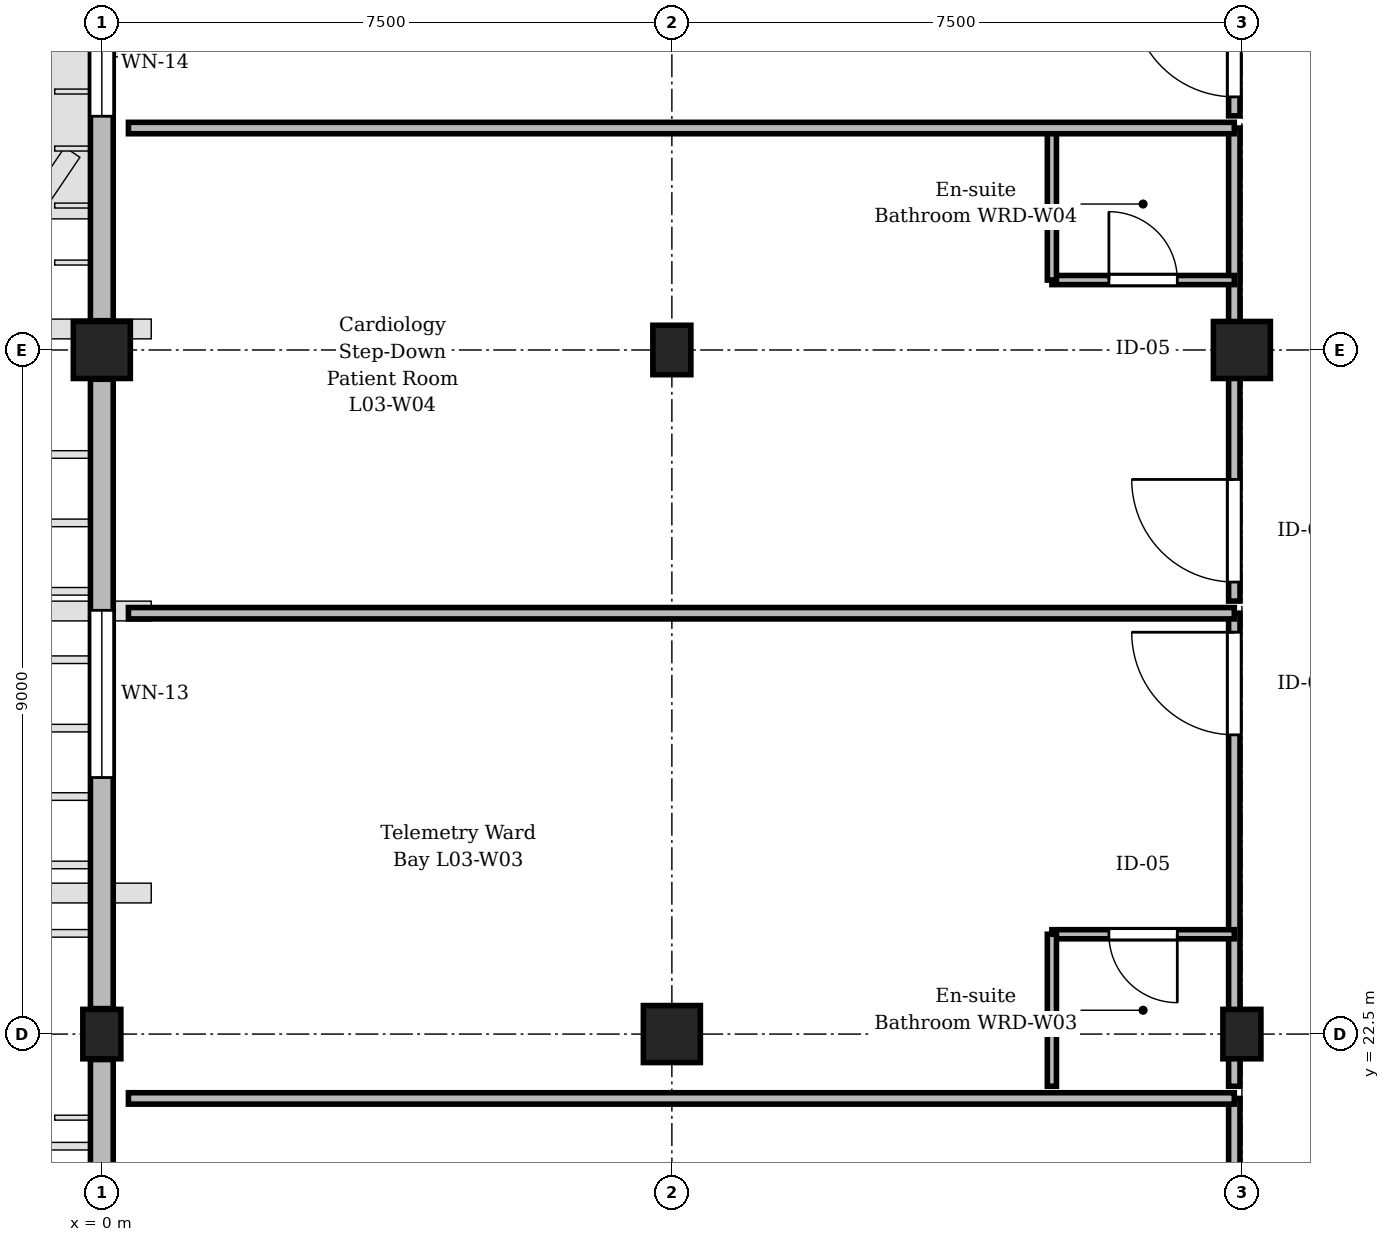
"""IFC4 building model, lengths in metres.
Left out: names, types, materials, properties, quantities, classifications, styles, units other than length and angle.
Written with IfcOpenShell. Run it as: python <this file> out.ifc"""

import sys

from ifc_helpers import new_model, si_unit, direction, frame, frame_2d, origin, origin_2d, place, context, subcontext, project, spatial, rectangle, extrude, element, fill, save


model = new_model("IFC4")
c1 = context("Model", 3, precision=1e-05, world=origin(), true_north=direction((0.0, 1.0)))
c2 = subcontext(c1, "Body", "Model", "MODEL_VIEW")
j1 = project(units=[si_unit("LENGTHUNIT", "METRE"), si_unit("PLANEANGLEUNIT", "RADIAN")], contexts=[c1])
p1 = place(None, origin())
s1 = spatial("IfcSite", under=j1, at=p1, CompositionType="ELEMENT")
p2 = place(p1, origin())
s2 = spatial("IfcBuilding", under=s1, at=p2, CompositionType="ELEMENT")
p3 = place(p2, frame((0.0, 0.0, 14.1)))
s3 = spatial("IfcBuildingStorey", under=s2, at=p3, CompositionType="ELEMENT", Elevation=14.1)
p4 = place(p3, frame((0.0, 22.5, 0.0), z_axis=(0.0, 0.0, 1.0), x_axis=(1.0, 0.0, 0.0)))
e1 = element("IfcColumn", 1, at=p4, inside=s3, PredefinedType="COLUMN", context=c2, shape_type="SweptSolid", body=[
    extrude(rectangle(XDim=0.5, YDim=0.65, at=origin_2d()), origin(), (0.0, 0.0, 1.0), 3.75),
])
for number, where, z_axis, x_axis in (
    (2, (0.0, 31.5, 0.0), (0.0, 0.0, 1.0), (1.0, 0.0, 0.0)),
    (3, (7.5, 22.5, 0.0), (0.0, 0.0, 1.0), (1.0, 0.0, 0.0)),
):
    element("IfcColumn", number, at=place(p3, frame(where, z_axis=z_axis, x_axis=x_axis)), inside=s3, PredefinedType="COLUMN", context=c2, shape_type="SweptSolid", body=[
        extrude(rectangle(XDim=0.75, YDim=0.75, at=origin_2d()), origin(), (0.0, 0.0, 1.0), 3.75),
    ])
for number, where, z_axis, x_axis in (
    (4, (7.5, 31.5, 0.0), (0.0, 0.0, 1.0), (1.0, 0.0, 0.0)),
    (5, (15.0, 22.5, 0.0), (0.0, 0.0, 1.0), (1.0, 0.0, 0.0)),
):
    element("IfcColumn", number, at=place(p3, frame(where, z_axis=z_axis, x_axis=x_axis)), inside=s3, PredefinedType="COLUMN", context=c2, shape_type="SweptSolid", body=[
        extrude(rectangle(XDim=0.5, YDim=0.65, at=origin_2d()), origin(), (0.0, 0.0, 1.0), 3.75),
    ])
p5 = place(p3, frame((15.0, 31.5, 0.0), z_axis=(0.0, 0.0, 1.0), x_axis=(1.0, 0.0, 0.0)))
e6 = element("IfcColumn", 6, at=p5, inside=s3, PredefinedType="COLUMN", context=c2, shape_type="SweptSolid", body=[
    extrude(rectangle(XDim=0.75, YDim=0.75, at=origin_2d()), origin(), (0.0, 0.0, 1.0), 3.75),
])
p6 = place(p3, frame((0.0, 15.385, 0.0), z_axis=(0.0, 0.0, 1.0), x_axis=(0.0, 1.0, 0.0)))
e7 = element("IfcWall", 7, at=p6, inside=s3, PredefinedType="STANDARD", context=c2, shape_type="SweptSolid", body=[
    extrude(rectangle(XDim=6.78, YDim=0.3, at=frame_2d((3.39, 0.0))), origin(), (0.0, 0.0, 1.0), 2.87),
])
p7 = place(p6, frame((2.39, 0.0, 0.9)))
e8 = element("IfcOpeningElement", 8, at=p7, cuts=e7, PredefinedType="OPENING", context=c2, shape_type="SweptSolid", body=[
    extrude(rectangle(XDim=2.0, YDim=1.69, at=frame_2d((1.0, 0.845))), frame((0.0, 0.16, 0.0), z_axis=(0.0, -1.0, 0.0), x_axis=(1.0, 0.0, 0.0)), (0.0, 0.0, 1.0), 0.32),
])
p8 = place(p3, frame((0.0, 22.835, 0.0), z_axis=(0.0, 0.0, 1.0), x_axis=(0.0, 1.0, 0.0)))
e9 = element("IfcWall", 9, at=p8, inside=s3, PredefinedType="STANDARD", context=c2, shape_type="SweptSolid", body=[
    extrude(rectangle(XDim=8.28, YDim=0.3, at=frame_2d((4.14, 0.0))), origin(), (0.0, 0.0, 1.0), 2.92),
])
p9 = place(p8, frame((3.04, 0.0, 0.9)))
e10 = element("IfcOpeningElement", 10, at=p9, cuts=e9, PredefinedType="OPENING", context=c2, shape_type="SweptSolid", body=[
    extrude(rectangle(XDim=2.2, YDim=1.74, at=frame_2d((1.1, 0.87))), frame((0.0, 0.16, 0.0), z_axis=(0.0, -1.0, 0.0), x_axis=(1.0, 0.0, 0.0)), (0.0, 0.0, 1.0), 0.32),
])
p10 = place(p3, frame((0.0, 31.885, 0.0), z_axis=(0.0, 0.0, 1.0), x_axis=(0.0, 1.0, 0.0)))
e11 = element("IfcWall", 11, at=p10, inside=s3, PredefinedType="STANDARD", context=c2, shape_type="SweptSolid", body=[
    extrude(rectangle(XDim=6.78, YDim=0.3, at=frame_2d((3.39, 0.0))), origin(), (0.0, 0.0, 1.0), 2.87),
])
p11 = place(p10, frame((2.69, 0.0, 0.9)))
e12 = element("IfcOpeningElement", 12, at=p11, cuts=e11, PredefinedType="OPENING", context=c2, shape_type="SweptSolid", body=[
    extrude(rectangle(XDim=1.4, YDim=1.69, at=frame_2d((0.7, 0.845))), frame((0.0, 0.16, 0.0), z_axis=(0.0, -1.0, 0.0), x_axis=(1.0, 0.0, 0.0)), (0.0, 0.0, 1.0), 0.32),
])
p12 = place(p3, frame((14.9, 15.43, 0.0), z_axis=(0.0, 0.0, 1.0), x_axis=(0.0, 1.0, 0.0)))
e13 = element("IfcWall", 13, at=p12, inside=s3, PredefinedType="PARTITIONING", context=c2, shape_type="SweptSolid", body=[
    extrude(rectangle(XDim=6.223, YDim=0.15, at=frame_2d((3.112, 0.0))), origin(), (0.0, 0.0, 1.0), 2.905),
])
p13 = place(p12, frame((2.874, 0.0, 0.0)))
e14 = element("IfcOpeningElement", 14, at=p13, cuts=e13, PredefinedType="OPENING", context=c2, shape_type="SweptSolid", body=[
    extrude(rectangle(XDim=1.35, YDim=2.25, at=frame_2d((0.675, 1.125))), frame((0.0, 0.085, 0.0), z_axis=(0.0, -1.0, 0.0), x_axis=(1.0, 0.0, 0.0)), (0.0, 0.0, 1.0), 0.17),
])
p14 = place(p3, frame((14.9, 21.813, 0.0), z_axis=(0.0, 0.0, 1.0), x_axis=(0.0, 1.0, 0.0)))
e15 = element("IfcWall", 15, at=p14, inside=s3, PredefinedType="PARTITIONING", context=c2, shape_type="SweptSolid", body=[
    extrude(rectangle(XDim=6.223, YDim=0.15, at=frame_2d((3.112, 0.0))), origin(), (0.0, 0.0, 1.0), 2.755),
])
p15 = place(p14, frame((4.623, 0.0, 0.0)))
e16 = element("IfcOpeningElement", 16, at=p15, cuts=e15, PredefinedType="OPENING", context=c2, shape_type="SweptSolid", body=[
    extrude(rectangle(XDim=1.35, YDim=2.25, at=frame_2d((0.675, 1.125))), frame((0.0, 0.085, 0.0), z_axis=(0.0, -1.0, 0.0), x_axis=(1.0, 0.0, 0.0)), (0.0, 0.0, 1.0), 0.17),
])
p16 = place(p3, frame((14.9, 23.813, 0.0), z_axis=(0.0, 0.0, 1.0), x_axis=(-1.0, 0.0, 0.0)))
e17 = element("IfcWall", 17, at=p16, inside=s3, PredefinedType="PARTITIONING", context=c2, shape_type="SweptSolid", body=[
    extrude(rectangle(XDim=2.4, YDim=0.12, at=frame_2d((1.2, 0.0))), origin(), (0.0, 0.0, 1.0), 3.455),
])
p17 = place(p16, frame((0.75, 0.0, 0.0)))
e18 = element("IfcOpeningElement", 18, at=p17, cuts=e17, PredefinedType="OPENING", context=c2, shape_type="SweptSolid", body=[
    extrude(rectangle(XDim=0.9, YDim=2.1, at=frame_2d((0.45, 1.05))), frame((0.0, 0.07, 0.0), z_axis=(0.0, -1.0, 0.0), x_axis=(1.0, 0.0, 0.0)), (0.0, 0.0, 1.0), 0.14),
])
p18 = place(p3, frame((12.5, 21.813, 0.0), z_axis=(0.0, 0.0, 1.0), x_axis=(0.0, 1.0, 0.0)))
e19 = element("IfcWall", 19, at=p18, inside=s3, PredefinedType="PARTITIONING", context=c2, shape_type="SweptSolid", body=[
    extrude(rectangle(XDim=2.0, YDim=0.12, at=frame_2d((1.0, 0.0))), origin(), (0.0, 0.0, 1.0), 3.455),
])
p19 = place(p3, frame((14.9, 28.197, 0.0), z_axis=(0.0, 0.0, 1.0), x_axis=(0.0, 1.0, 0.0)))
e20 = element("IfcWall", 20, at=p19, inside=s3, PredefinedType="PARTITIONING", context=c2, shape_type="SweptSolid", body=[
    extrude(rectangle(XDim=6.223, YDim=0.15, at=frame_2d((3.112, 0.0))), origin(), (0.0, 0.0, 1.0), 2.755),
])
p20 = place(p19, frame((0.25, 0.0, 0.0)))
e21 = element("IfcOpeningElement", 21, at=p20, cuts=e20, PredefinedType="OPENING", context=c2, shape_type="SweptSolid", body=[
    extrude(rectangle(XDim=1.35, YDim=2.25, at=frame_2d((0.675, 1.125))), frame((0.0, 0.085, 0.0), z_axis=(0.0, -1.0, 0.0), x_axis=(1.0, 0.0, 0.0)), (0.0, 0.0, 1.0), 0.17),
])
p21 = place(p3, frame((12.5, 32.42, 0.0), z_axis=(0.0, 0.0, 1.0), x_axis=(1.0, 0.0, 0.0)))
e22 = element("IfcWall", 22, at=p21, inside=s3, PredefinedType="PARTITIONING", context=c2, shape_type="SweptSolid", body=[
    extrude(rectangle(XDim=2.4, YDim=0.12, at=frame_2d((1.2, 0.0))), origin(), (0.0, 0.0, 1.0), 3.455),
])
p22 = place(p21, frame((0.75, 0.0, 0.0)))
e23 = element("IfcOpeningElement", 23, at=p22, cuts=e22, PredefinedType="OPENING", context=c2, shape_type="SweptSolid", body=[
    extrude(rectangle(XDim=0.9, YDim=2.1, at=frame_2d((0.45, 1.05))), frame((0.0, 0.07, 0.0), z_axis=(0.0, -1.0, 0.0), x_axis=(1.0, 0.0, 0.0)), (0.0, 0.0, 1.0), 0.14),
])
p23 = place(p3, frame((12.5, 32.42, 0.0), z_axis=(0.0, 0.0, 1.0), x_axis=(0.0, 1.0, 0.0)))
e24 = element("IfcWall", 24, at=p23, inside=s3, PredefinedType="PARTITIONING", context=c2, shape_type="SweptSolid", body=[
    extrude(rectangle(XDim=2.0, YDim=0.12, at=frame_2d((1.0, 0.0))), origin(), (0.0, 0.0, 1.0), 3.455),
])
p24 = place(p3, frame((14.9, 34.58, 0.0), z_axis=(0.0, 0.0, 1.0), x_axis=(0.0, 1.0, 0.0)))
e25 = element("IfcWall", 25, at=p24, inside=s3, PredefinedType="PARTITIONING", context=c2, shape_type="SweptSolid", body=[
    extrude(rectangle(XDim=6.223, YDim=0.15, at=frame_2d((3.112, 0.0))), origin(), (0.0, 0.0, 1.0), 2.905),
])
p25 = place(p24, frame((0.25, 0.0, 0.0)))
e26 = element("IfcOpeningElement", 26, at=p25, cuts=e25, PredefinedType="OPENING", context=c2, shape_type="SweptSolid", body=[
    extrude(rectangle(XDim=1.35, YDim=2.25, at=frame_2d((0.675, 1.125))), frame((0.0, 0.085, 0.0), z_axis=(0.0, -1.0, 0.0), x_axis=(1.0, 0.0, 0.0)), (0.0, 0.0, 1.0), 0.17),
])
for number, where, z_axis, x_axis in (
    (27, (0.35, 21.653, 0.0), (0.0, 0.0, 1.0), (1.0, 0.0, 0.0)),
    (28, (0.35, 28.037, 0.0), (0.0, 0.0, 1.0), (1.0, 0.0, 0.0)),
    (29, (0.35, 34.42, 0.0), (0.0, 0.0, 1.0), (1.0, 0.0, 0.0)),
):
    element("IfcWall", number, at=place(p3, frame(where, z_axis=z_axis, x_axis=x_axis)), inside=s3, PredefinedType="PARTITIONING", context=c2, shape_type="SweptSolid", body=[
        extrude(rectangle(XDim=14.55, YDim=0.15, at=frame_2d((7.275, 0.0))), origin(), (0.0, 0.0, 1.0), 3.455),
    ])
p26 = place(p9, origin())
e30 = element("IfcWindow", 30, at=p26, inside=s3, PartitioningType="SINGLE_PANEL", PredefinedType="WINDOW", context=c2, shape_type="SweptSolid", body=[
    extrude(rectangle(XDim=2.2, YDim=1.74, at=frame_2d((1.1, 0.87))), frame((0.0, 0.03, 0.0), z_axis=(0.0, -1.0, 0.0), x_axis=(1.0, 0.0, 0.0)), (0.0, 0.0, 1.0), 0.06),
])
fill(e10, e30)
p27 = place(p11, origin())
e31 = element("IfcWindow", 31, at=p27, inside=s3, PartitioningType="SINGLE_PANEL", PredefinedType="WINDOW", context=c2, shape_type="SweptSolid", body=[
    extrude(rectangle(XDim=1.4, YDim=1.69, at=frame_2d((0.7, 0.845))), frame((0.0, 0.03, 0.0), z_axis=(0.0, -1.0, 0.0), x_axis=(1.0, 0.0, 0.0)), (0.0, 0.0, 1.0), 0.06),
])
fill(e12, e31)
p28 = place(p15, origin())
e32 = element("IfcDoor", 32, at=p28, inside=s3, OperationType="SINGLE_SWING_RIGHT", PredefinedType="DOOR", context=c2, shape_type="SweptSolid", body=[
    extrude(rectangle(XDim=1.35, YDim=2.25, at=frame_2d((0.675, 1.125))), frame((0.0, 0.025, 0.0), z_axis=(0.0, -1.0, 0.0), x_axis=(1.0, 0.0, 0.0)), (0.0, 0.0, 1.0), 0.05),
])
fill(e16, e32)
p29 = place(p17, origin())
e33 = element("IfcDoor", 33, at=p29, inside=s3, OperationType="SINGLE_SWING_LEFT", PredefinedType="DOOR", context=c2, shape_type="SweptSolid", body=[
    extrude(rectangle(XDim=0.9, YDim=2.1, at=frame_2d((0.45, 1.05))), frame((0.0, 0.025, 0.0), z_axis=(0.0, -1.0, 0.0), x_axis=(1.0, 0.0, 0.0)), (0.0, 0.0, 1.0), 0.05),
])
fill(e18, e33)
p30 = place(p20, origin())
e34 = element("IfcDoor", 34, at=p30, inside=s3, OperationType="SINGLE_SWING_RIGHT", PredefinedType="DOOR", context=c2, shape_type="SweptSolid", body=[
    extrude(rectangle(XDim=1.35, YDim=2.25, at=frame_2d((0.675, 1.125))), frame((0.0, 0.025, 0.0), z_axis=(0.0, -1.0, 0.0), x_axis=(1.0, 0.0, 0.0)), (0.0, 0.0, 1.0), 0.05),
])
fill(e21, e34)
p31 = place(p22, origin())
e35 = element("IfcDoor", 35, at=p31, inside=s3, OperationType="SINGLE_SWING_LEFT", PredefinedType="DOOR", context=c2, shape_type="SweptSolid", body=[
    extrude(rectangle(XDim=0.9, YDim=2.1, at=frame_2d((0.45, 1.05))), frame((0.0, 0.025, 0.0), z_axis=(0.0, -1.0, 0.0), x_axis=(1.0, 0.0, 0.0)), (0.0, 0.0, 1.0), 0.05),
])
fill(e23, e35)
p32 = place(p25, origin())
e36 = element("IfcDoor", 36, at=p32, inside=s3, OperationType="SINGLE_SWING_RIGHT", PredefinedType="DOOR", context=c2, shape_type="SweptSolid", body=[
    extrude(rectangle(XDim=1.35, YDim=2.25, at=frame_2d((0.675, 1.125))), frame((0.0, 0.025, 0.0), z_axis=(0.0, -1.0, 0.0), x_axis=(1.0, 0.0, 0.0)), (0.0, 0.0, 1.0), 0.05),
])
fill(e26, e36)
save(model, sys.argv[1])
